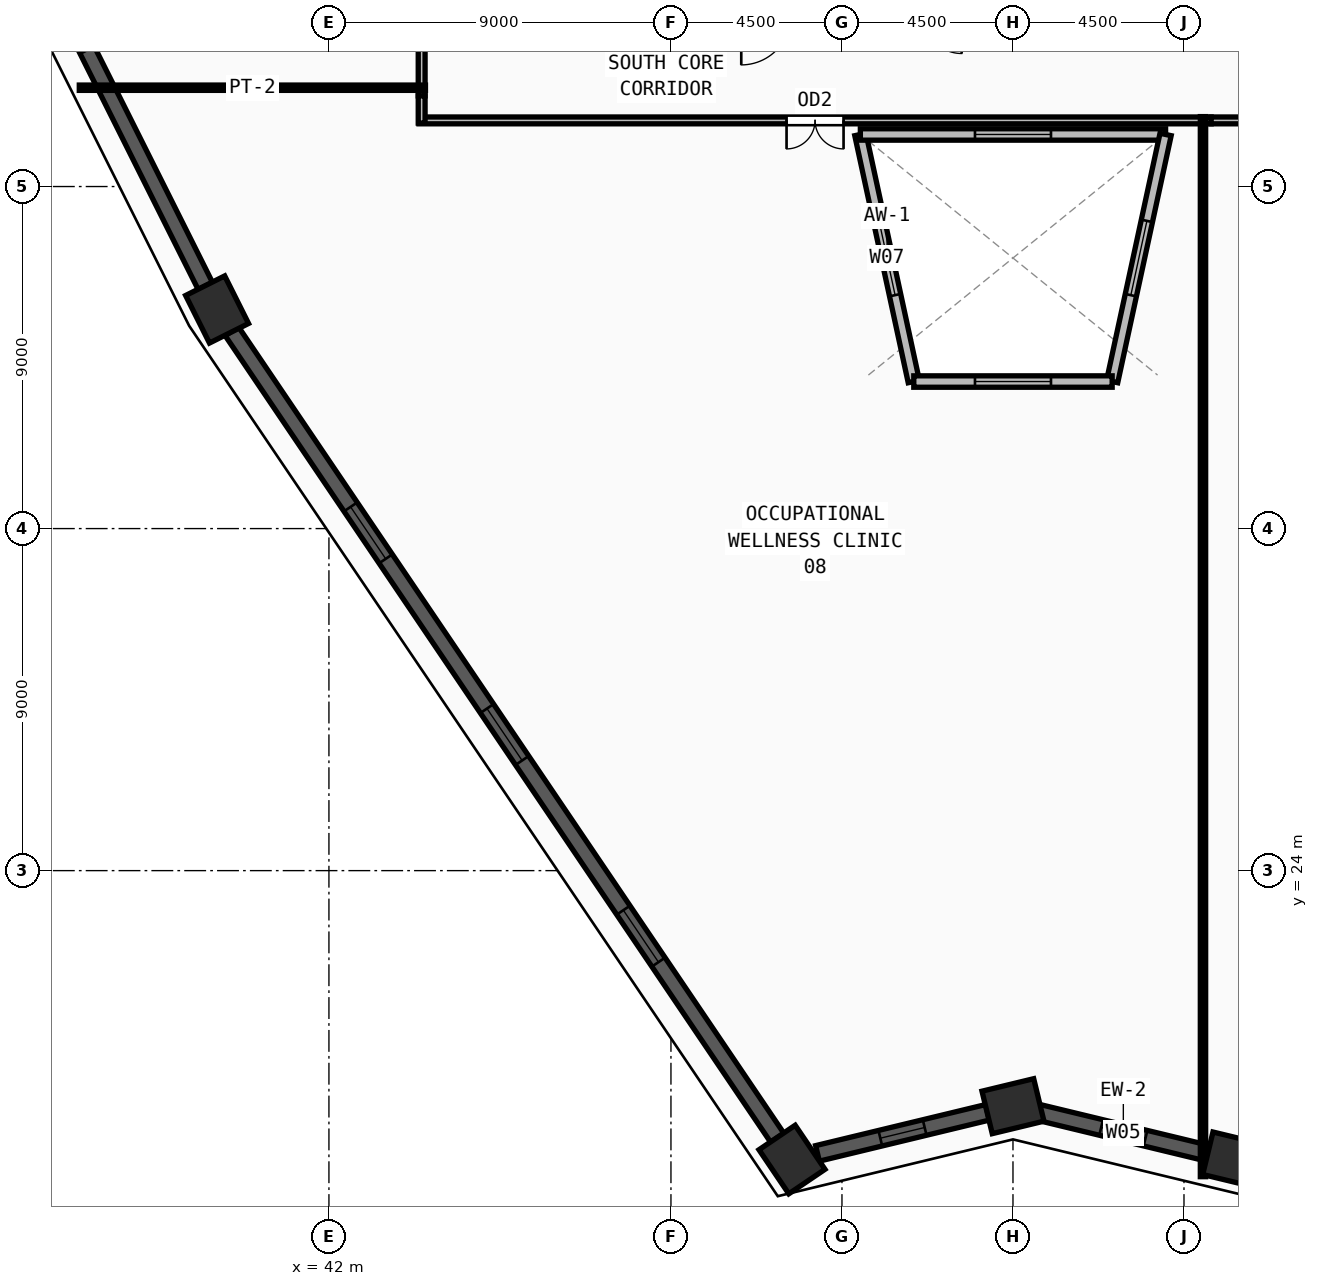
"""IFC4 building model, lengths in metres.
Left out: names, types, materials, properties, quantities, classifications, styles, units other than length and angle.
Written with IfcOpenShell. Run it as: python <this file> out.ifc"""

import sys

from ifc_helpers import new_model, si_unit, direction, frame, frame_2d, origin, origin_2d, place, context, subcontext, project, spatial, rectangle, extrude, source, transform, mapped, element, fill, save


model = new_model("IFC4")
c1 = context("Model", 3, precision=1e-05, world=origin(), true_north=direction((0.0, 1.0)))
c2 = subcontext(c1, "Body", "Model", "MODEL_VIEW")
j1 = project(units=[si_unit("LENGTHUNIT", "METRE"), si_unit("PLANEANGLEUNIT", "RADIAN")], contexts=[c1])
p1 = place(None, origin())
s1 = spatial("IfcSite", under=j1, at=p1, CompositionType="ELEMENT")
p2 = place(p1, origin())
s2 = spatial("IfcBuilding", under=s1, at=p2, CompositionType="ELEMENT")
p3 = place(p2, frame((0.0, 0.0, 144.0)))
s3 = spatial("IfcBuildingStorey", under=s2, at=p3, CompositionType="ELEMENT", Elevation=144.0)
m1 = source(origin(), c2, "Body", "SweptSolid", [
    extrude(rectangle(XDim=1.4, YDim=1.15, at=origin_2d()), origin(), (0.0, 0.0, 1.0), 3.75),
])
for number, where, z_axis, x_axis in (
    (1, (54.185, 16.398, 0.0), (0.0, 0.0, 1.0), (-0.56, 0.828, 0.0)),
    (2, (39.057, 38.765, 0.0), (0.0, 0.0, 1.0), (-0.448, 0.894, 0.0)),
    (3, (65.808, 16.399, 0.0), (0.0, 0.0, 1.0), (-0.972, 0.235, 0.0)),
    (4, (60.0, 17.802, 0.0), (0.0, 0.0, 1.0), (0.972, 0.235, 0.0)),
):
    element("IfcColumn", number, at=place(p3, frame(where, z_axis=z_axis, x_axis=x_axis)), inside=s3, PredefinedType="COLUMN", context=c2, shape_type="MappedRepresentation", body=[
        mapped(m1, transform((0.0, 0.0, 0.0), x_axis=(1.0, 0.0, 0.0), y_axis=(0.0, 1.0, 0.0), z_axis=(0.0, 0.0, 1.0), scale=1.0)),
    ])
p4 = place(p3, frame((60.671, 17.64, 0.0), z_axis=(0.0, 0.0, 1.0), x_axis=(0.972040399781, -0.234813673352, 0.0)))
e5 = element("IfcWall", 5, at=p4, inside=s3, PredefinedType="SOLIDWALL", context=c2, shape_type="SweptSolid", body=[
    extrude(rectangle(XDim=4.594, YDim=0.42, at=frame_2d((2.297, 0.0))), origin(), (0.0, 0.0, 1.0), 3.57),
])
m2 = source(origin(), c2, "Body", "SweptSolid", [
    extrude(rectangle(XDim=1.2, YDim=1.9, at=frame_2d((0.6, 0.95))), frame((0.0, 0.22, 0.0), z_axis=(0.0, -1.0, 0.0), x_axis=(1.0, 0.0, 0.0)), (0.0, 0.0, 1.0), 0.44),
])
p5 = place(p4, frame((1.697, 0.0, 0.55)))
e6 = element("IfcOpeningElement", 6, at=p5, cuts=e5, PredefinedType="OPENING", context=c2, shape_type="MappedRepresentation", body=[
    mapped(m2, transform((0.0, 0.0, 0.0), x_axis=(1.0, 0.0, 0.0), y_axis=(0.0, 1.0, 0.0), z_axis=(0.0, 0.0, 1.0), scale=1.0)),
])
p6 = place(p3, frame((24.842, 67.153, 0.0), z_axis=(0.0, 0.0, 1.0), x_axis=(0.447741761442, -0.894162913043, 0.0)))
e7 = element("IfcWall", 7, at=p6, inside=s3, PredefinedType="SOLIDWALL", context=c2, shape_type="SweptSolid", body=[
    extrude(rectangle(XDim=31.058, YDim=0.42, at=frame_2d((15.529, 0.0))), origin(), (0.0, 0.0, 1.0), 3.57),
])
m3 = source(origin(), c2, "Body", "SweptSolid", [
    extrude(rectangle(XDim=1.65, YDim=1.95, at=frame_2d((0.825, 0.975))), frame((0.0, 0.22, 0.0), z_axis=(0.0, -1.0, 0.0), x_axis=(1.0, 0.0, 0.0)), (0.0, 0.0, 1.0), 0.44),
])
p7 = place(p6, frame((6.94, 0.0, 0.55)))
e8 = element("IfcOpeningElement", 8, at=p7, cuts=e7, PredefinedType="OPENING", context=c2, shape_type="MappedRepresentation", body=[
    mapped(m3, transform((0.0, 0.0, 0.0), x_axis=(1.0, 0.0, 0.0), y_axis=(0.0, 1.0, 0.0), z_axis=(0.0, 0.0, 1.0), scale=1.0)),
])
p8 = place(p6, frame((16.254, 0.0, 0.55)))
e9 = element("IfcOpeningElement", 9, at=p8, cuts=e7, PredefinedType="OPENING", context=c2, shape_type="MappedRepresentation", body=[
    mapped(m3, transform((0.0, 0.0, 0.0), x_axis=(1.0, 0.0, 0.0), y_axis=(0.0, 1.0, 0.0), z_axis=(0.0, 0.0, 1.0), scale=1.0)),
])
p9 = place(p6, frame((22.469, 0.0, 0.55)))
e10 = element("IfcOpeningElement", 10, at=p9, cuts=e7, PredefinedType="OPENING", context=c2, shape_type="MappedRepresentation", body=[
    mapped(m3, transform((0.0, 0.0, 0.0), x_axis=(1.0, 0.0, 0.0), y_axis=(0.0, 1.0, 0.0), z_axis=(0.0, 0.0, 1.0), scale=1.0)),
])
p10 = place(p3, frame((39.444, 38.193, 0.0), z_axis=(0.0, 0.0, 1.0), x_axis=(0.560233610346, -0.828334655703, 0.0)))
e11 = element("IfcWall", 11, at=p10, inside=s3, PredefinedType="SOLIDWALL", context=c2, shape_type="SweptSolid", body=[
    extrude(rectangle(XDim=25.622, YDim=0.42, at=frame_2d((12.811, 0.0))), origin(), (0.0, 0.0, 1.0), 3.57),
])
p11 = place(p10, frame((5.58, 0.0, 0.55)))
e12 = element("IfcOpeningElement", 12, at=p11, cuts=e11, PredefinedType="OPENING", context=c2, shape_type="MappedRepresentation", body=[
    mapped(m3, transform((0.0, 0.0, 0.0), x_axis=(1.0, 0.0, 0.0), y_axis=(0.0, 1.0, 0.0), z_axis=(0.0, 0.0, 1.0), scale=1.0)),
])
p12 = place(p10, frame((11.986, 0.0, 0.55)))
e13 = element("IfcOpeningElement", 13, at=p12, cuts=e11, PredefinedType="OPENING", context=c2, shape_type="MappedRepresentation", body=[
    mapped(m3, transform((0.0, 0.0, 0.0), x_axis=(1.0, 0.0, 0.0), y_axis=(0.0, 1.0, 0.0), z_axis=(0.0, 0.0, 1.0), scale=1.0)),
])
p13 = place(p10, frame((18.391, 0.0, 0.55)))
e14 = element("IfcOpeningElement", 14, at=p13, cuts=e11, PredefinedType="OPENING", context=c2, shape_type="MappedRepresentation", body=[
    mapped(m3, transform((0.0, 0.0, 0.0), x_axis=(1.0, 0.0, 0.0), y_axis=(0.0, 1.0, 0.0), z_axis=(0.0, 0.0, 1.0), scale=1.0)),
])
p14 = place(p3, frame((54.856, 16.56, 0.0), z_axis=(0.0, 0.0, 1.0), x_axis=(0.972076783572, 0.234663006972, 0.0)))
e15 = element("IfcWall", 15, at=p14, inside=s3, PredefinedType="SOLIDWALL", context=c2, shape_type="SweptSolid", body=[
    extrude(rectangle(XDim=4.602, YDim=0.42, at=frame_2d((2.301, 0.0))), origin(), (0.0, 0.0, 1.0), 3.57),
])
p15 = place(p14, frame((1.701, 0.0, 0.55)))
e16 = element("IfcOpeningElement", 16, at=p15, cuts=e15, PredefinedType="OPENING", context=c2, shape_type="MappedRepresentation", body=[
    mapped(m2, transform((0.0, 0.0, 0.0), x_axis=(1.0, 0.0, 0.0), y_axis=(0.0, 1.0, 0.0), z_axis=(0.0, 0.0, 1.0), scale=1.0)),
])
p16 = place(p3, frame((57.39, 36.869, 0.0), z_axis=(0.0, 0.0, 1.0), x_axis=(-0.21138112539, 0.97740371384, 0.0)))
e17 = element("IfcWall", 17, at=p16, inside=s3, PredefinedType="SOLIDWALL", context=c2, shape_type="SweptSolid", body=[
    extrude(rectangle(XDim=6.652, YDim=0.3, at=frame_2d((3.326, 0.0))), origin(), (0.0, 0.0, 1.0), 3.57),
])
m4 = source(origin(), c2, "Body", "SweptSolid", [
    extrude(rectangle(XDim=2.0, YDim=1.9, at=frame_2d((1.0, 0.95))), frame((0.0, 0.16, 0.0), z_axis=(0.0, -1.0, 0.0), x_axis=(1.0, 0.0, 0.0)), (0.0, 0.0, 1.0), 0.32),
])
p17 = place(p16, frame((2.326, 0.0, 0.55)))
e18 = element("IfcOpeningElement", 18, at=p17, cuts=e17, PredefinedType="OPENING", context=c2, shape_type="MappedRepresentation", body=[
    mapped(m4, transform((0.0, 0.0, 0.0), x_axis=(1.0, 0.0, 0.0), y_axis=(0.0, 1.0, 0.0), z_axis=(0.0, 0.0, 1.0), scale=1.0)),
])
p18 = place(p3, frame((55.984, 43.37, 0.0), z_axis=(0.0, 0.0, 1.0), x_axis=(1.0, 0.0, 0.0)))
e19 = element("IfcWall", 19, at=p18, inside=s3, PredefinedType="SOLIDWALL", context=c2, shape_type="SweptSolid", body=[
    extrude(rectangle(XDim=8.032, YDim=0.3, at=frame_2d((4.016, 0.0))), origin(), (0.0, 0.0, 1.0), 3.57),
])
p19 = place(p18, frame((3.016, 0.0, 0.55)))
e20 = element("IfcOpeningElement", 20, at=p19, cuts=e19, PredefinedType="OPENING", context=c2, shape_type="MappedRepresentation", body=[
    mapped(m4, transform((0.0, 0.0, 0.0), x_axis=(1.0, 0.0, 0.0), y_axis=(0.0, 1.0, 0.0), z_axis=(0.0, 0.0, 1.0), scale=1.0)),
])
p20 = place(p3, frame((64.016, 43.37, 0.0), z_axis=(0.0, 0.0, 1.0), x_axis=(-0.21138112539, -0.97740371384, 0.0)))
e21 = element("IfcWall", 21, at=p20, inside=s3, PredefinedType="SOLIDWALL", context=c2, shape_type="SweptSolid", body=[
    extrude(rectangle(XDim=6.652, YDim=0.3, at=frame_2d((3.326, 0.0))), origin(), (0.0, 0.0, 1.0), 3.57),
])
p21 = place(p20, frame((2.326, 0.0, 0.55)))
e22 = element("IfcOpeningElement", 22, at=p21, cuts=e21, PredefinedType="OPENING", context=c2, shape_type="MappedRepresentation", body=[
    mapped(m4, transform((0.0, 0.0, 0.0), x_axis=(1.0, 0.0, 0.0), y_axis=(0.0, 1.0, 0.0), z_axis=(0.0, 0.0, 1.0), scale=1.0)),
])
p22 = place(p3, frame((62.61, 36.869, 0.0), z_axis=(0.0, 0.0, 1.0), x_axis=(-1.0, 0.0, 0.0)))
e23 = element("IfcWall", 23, at=p22, inside=s3, PredefinedType="SOLIDWALL", context=c2, shape_type="SweptSolid", body=[
    extrude(rectangle(XDim=5.22, YDim=0.3, at=frame_2d((2.61, 0.0))), origin(), (0.0, 0.0, 1.0), 3.57),
])
p23 = place(p22, frame((1.61, 0.0, 0.55)))
e24 = element("IfcOpeningElement", 24, at=p23, cuts=e23, PredefinedType="OPENING", context=c2, shape_type="MappedRepresentation", body=[
    mapped(m4, transform((0.0, 0.0, 0.0), x_axis=(1.0, 0.0, 0.0), y_axis=(0.0, 1.0, 0.0), z_axis=(0.0, 0.0, 1.0), scale=1.0)),
])
p24 = place(p3, frame((44.44, 44.385, 0.0), z_axis=(0.0, 0.0, 1.0), x_axis=(0.0, 1.0, 0.0)))
e25 = element("IfcWall", 25, at=p24, inside=s3, PredefinedType="PARTITIONING", context=c2, shape_type="SweptSolid", body=[
    extrude(rectangle(XDim=5.83, YDim=0.18, at=frame_2d((2.915, 0.0))), origin(), (0.0, 0.0, 1.0), 3.57),
])
m5 = source(origin(), c2, "Body", "SweptSolid", [
    extrude(rectangle(XDim=1.0, YDim=2.2, at=frame_2d((0.5, 1.1))), frame((0.0, 0.1, 0.0), z_axis=(0.0, -1.0, 0.0), x_axis=(1.0, 0.0, 0.0)), (0.0, 0.0, 1.0), 0.2),
])
p25 = place(p24, frame((2.415, 0.0, 0.0)))
e26 = element("IfcOpeningElement", 26, at=p25, cuts=e25, PredefinedType="OPENING", context=c2, shape_type="MappedRepresentation", body=[
    mapped(m5, transform((0.0, 0.0, 0.0), x_axis=(1.0, 0.0, 0.0), y_axis=(0.0, 1.0, 0.0), z_axis=(0.0, 0.0, 1.0), scale=1.0)),
])
p26 = place(p3, frame((65.215, 43.74, 0.0), z_axis=(0.0, 0.0, 1.0), x_axis=(-1.0, 0.0, 0.0)))
e27 = element("IfcWall", 27, at=p26, inside=s3, PredefinedType="PARTITIONING", context=c2, shape_type="SweptSolid", body=[
    extrude(rectangle(XDim=20.845, YDim=0.18, at=frame_2d((10.422, 0.0))), origin(), (0.0, 0.0, 1.0), 3.57),
])
m6 = source(origin(), c2, "Body", "SweptSolid", [
    extrude(rectangle(XDim=1.5, YDim=2.2, at=frame_2d((0.75, 1.1))), frame((0.0, 0.1, 0.0), z_axis=(0.0, -1.0, 0.0), x_axis=(1.0, 0.0, 0.0)), (0.0, 0.0, 1.0), 0.2),
])
p27 = place(p26, frame((9.673, 0.0, 0.0)))
e28 = element("IfcOpeningElement", 28, at=p27, cuts=e27, PredefinedType="OPENING", context=c2, shape_type="MappedRepresentation", body=[
    mapped(m6, transform((0.0, 0.0, 0.0), x_axis=(1.0, 0.0, 0.0), y_axis=(0.0, 1.0, 0.0), z_axis=(0.0, 0.0, 1.0), scale=1.0)),
])
p28 = place(p3, frame((75.63, 43.74, 0.0), z_axis=(0.0, 0.0, 1.0), x_axis=(-1.0, 0.0, 0.0)))
e29 = element("IfcWall", 29, at=p28, inside=s3, PredefinedType="PARTITIONING", context=c2, shape_type="SweptSolid", body=[
    extrude(rectangle(XDim=10.415, YDim=0.18, at=frame_2d((5.208, 0.0))), origin(), (0.0, 0.0, 1.0), 3.57),
])
p29 = place(p28, frame((4.457, 0.0, 0.0)))
e30 = element("IfcOpeningElement", 30, at=p29, cuts=e29, PredefinedType="OPENING", context=c2, shape_type="MappedRepresentation", body=[
    mapped(m6, transform((0.0, 0.0, 0.0), x_axis=(1.0, 0.0, 0.0), y_axis=(0.0, 1.0, 0.0), z_axis=(0.0, 0.0, 1.0), scale=1.0)),
])
p30 = place(p3, frame((44.44, 43.67, 0.0), z_axis=(0.0, 0.0, 1.0), x_axis=(0.0, 1.0, 0.0)))
e31 = element("IfcWall", 31, at=p30, inside=s3, PredefinedType="PARTITIONING", context=c2, shape_type="SweptSolid", body=[
    extrude(rectangle(XDim=0.715, YDim=0.18, at=frame_2d((0.357, 0.0))), origin(), (0.0, 0.0, 1.0), 3.57),
])
p31 = place(p3, frame((44.54, 44.6, 0.0), z_axis=(0.0, 0.0, 1.0), x_axis=(-1.0, 0.0, 0.0)))
e32 = element("IfcWall", 32, at=p31, inside=s3, PredefinedType="PARTITIONING", context=c2, shape_type="SweptSolid", body=[
    extrude(rectangle(XDim=9.109, YDim=0.14, at=frame_2d((4.555, 0.0))), origin(), (0.0, 0.0, 1.0), 3.57),
])
p32 = place(p3, frame((65.0, 43.84, 0.0), z_axis=(0.0, 0.0, 1.0), x_axis=(0.0, -1.0, 0.0)))
e33 = element("IfcWall", 33, at=p32, inside=s3, PredefinedType="PARTITIONING", context=c2, shape_type="SweptSolid", body=[
    extrude(rectangle(XDim=27.893, YDim=0.14, at=frame_2d((13.947, 0.0))), origin(), (0.0, 0.0, 1.0), 3.57),
])
m7 = source(origin(), c2, "Body", "SweptSolid", [
    extrude(rectangle(XDim=1.2, YDim=1.9, at=frame_2d((0.6, 0.95))), frame((0.0, 0.03, 0.0), z_axis=(0.0, -1.0, 0.0), x_axis=(1.0, 0.0, 0.0)), (0.0, 0.0, 1.0), 0.06),
])
p33 = place(p5, origin())
e34 = element("IfcWindow", 34, at=p33, inside=s3, PartitioningType="SINGLE_PANEL", PredefinedType="WINDOW", context=c2, shape_type="MappedRepresentation", body=[
    mapped(m7, transform((0.0, 0.0, 0.0), x_axis=(1.0, 0.0, 0.0), y_axis=(0.0, 1.0, 0.0), z_axis=(0.0, 0.0, 1.0), scale=1.0)),
])
fill(e6, e34)
m8 = source(origin(), c2, "Body", "SweptSolid", [
    extrude(rectangle(XDim=1.65, YDim=1.95, at=frame_2d((0.825, 0.975))), frame((0.0, 0.03, 0.0), z_axis=(0.0, -1.0, 0.0), x_axis=(1.0, 0.0, 0.0)), (0.0, 0.0, 1.0), 0.06),
])
p34 = place(p11, origin())
e35 = element("IfcWindow", 35, at=p34, inside=s3, PartitioningType="DOUBLE_PANEL_VERTICAL", PredefinedType="WINDOW", context=c2, shape_type="MappedRepresentation", body=[
    mapped(m8, transform((0.0, 0.0, 0.0), x_axis=(1.0, 0.0, 0.0), y_axis=(0.0, 1.0, 0.0), z_axis=(0.0, 0.0, 1.0), scale=1.0)),
])
fill(e12, e35)
p35 = place(p12, origin())
e36 = element("IfcWindow", 36, at=p35, inside=s3, PartitioningType="DOUBLE_PANEL_VERTICAL", PredefinedType="WINDOW", context=c2, shape_type="MappedRepresentation", body=[
    mapped(m8, transform((0.0, 0.0, 0.0), x_axis=(1.0, 0.0, 0.0), y_axis=(0.0, 1.0, 0.0), z_axis=(0.0, 0.0, 1.0), scale=1.0)),
])
fill(e13, e36)
p36 = place(p13, origin())
e37 = element("IfcWindow", 37, at=p36, inside=s3, PartitioningType="DOUBLE_PANEL_VERTICAL", PredefinedType="WINDOW", context=c2, shape_type="MappedRepresentation", body=[
    mapped(m8, transform((0.0, 0.0, 0.0), x_axis=(1.0, 0.0, 0.0), y_axis=(0.0, 1.0, 0.0), z_axis=(0.0, 0.0, 1.0), scale=1.0)),
])
fill(e14, e37)
p37 = place(p15, origin())
e38 = element("IfcWindow", 38, at=p37, inside=s3, PartitioningType="SINGLE_PANEL", PredefinedType="WINDOW", context=c2, shape_type="MappedRepresentation", body=[
    mapped(m7, transform((0.0, 0.0, 0.0), x_axis=(1.0, 0.0, 0.0), y_axis=(0.0, 1.0, 0.0), z_axis=(0.0, 0.0, 1.0), scale=1.0)),
])
fill(e16, e38)
m9 = source(origin(), c2, "Body", "SweptSolid", [
    extrude(rectangle(XDim=2.0, YDim=1.9, at=frame_2d((1.0, 0.95))), frame((0.0, 0.03, 0.0), z_axis=(0.0, -1.0, 0.0), x_axis=(1.0, 0.0, 0.0)), (0.0, 0.0, 1.0), 0.06),
])
p38 = place(p17, origin())
e39 = element("IfcWindow", 39, at=p38, inside=s3, PartitioningType="DOUBLE_PANEL_VERTICAL", PredefinedType="WINDOW", context=c2, shape_type="MappedRepresentation", body=[
    mapped(m9, transform((0.0, 0.0, 0.0), x_axis=(1.0, 0.0, 0.0), y_axis=(0.0, 1.0, 0.0), z_axis=(0.0, 0.0, 1.0), scale=1.0)),
])
fill(e18, e39)
p39 = place(p19, origin())
e40 = element("IfcWindow", 40, at=p39, inside=s3, PartitioningType="DOUBLE_PANEL_VERTICAL", PredefinedType="WINDOW", context=c2, shape_type="MappedRepresentation", body=[
    mapped(m9, transform((0.0, 0.0, 0.0), x_axis=(1.0, 0.0, 0.0), y_axis=(0.0, 1.0, 0.0), z_axis=(0.0, 0.0, 1.0), scale=1.0)),
])
fill(e20, e40)
p40 = place(p21, origin())
e41 = element("IfcWindow", 41, at=p40, inside=s3, PartitioningType="DOUBLE_PANEL_VERTICAL", PredefinedType="WINDOW", context=c2, shape_type="MappedRepresentation", body=[
    mapped(m9, transform((0.0, 0.0, 0.0), x_axis=(1.0, 0.0, 0.0), y_axis=(0.0, 1.0, 0.0), z_axis=(0.0, 0.0, 1.0), scale=1.0)),
])
fill(e22, e41)
p41 = place(p23, origin())
e42 = element("IfcWindow", 42, at=p41, inside=s3, PartitioningType="DOUBLE_PANEL_VERTICAL", PredefinedType="WINDOW", context=c2, shape_type="MappedRepresentation", body=[
    mapped(m9, transform((0.0, 0.0, 0.0), x_axis=(1.0, 0.0, 0.0), y_axis=(0.0, 1.0, 0.0), z_axis=(0.0, 0.0, 1.0), scale=1.0)),
])
fill(e24, e42)
m10 = source(origin(), c2, "Body", "SweptSolid", [
    extrude(rectangle(XDim=1.5, YDim=2.2, at=frame_2d((0.75, 1.1))), frame((0.0, 0.025, 0.0), z_axis=(0.0, -1.0, 0.0), x_axis=(1.0, 0.0, 0.0)), (0.0, 0.0, 1.0), 0.05),
])
p42 = place(p27, origin())
e43 = element("IfcDoor", 43, at=p42, inside=s3, OperationType="DOUBLE_DOOR_SINGLE_SWING", PredefinedType="DOOR", context=c2, shape_type="MappedRepresentation", body=[
    mapped(m10, transform((0.0, 0.0, 0.0), x_axis=(1.0, 0.0, 0.0), y_axis=(0.0, 1.0, 0.0), z_axis=(0.0, 0.0, 1.0), scale=1.0)),
])
fill(e28, e43)
save(model, sys.argv[1])
